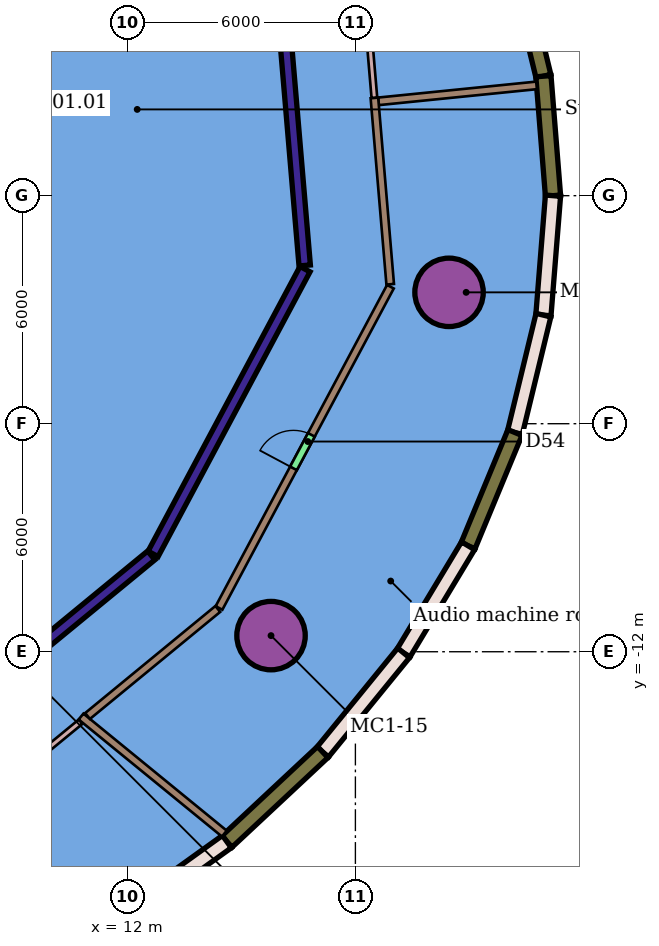
"""IFC4 building model, lengths in metres.
Left out: names, types, materials, properties, quantities, classifications, styles, units other than length and angle.
Written with IfcOpenShell. Run it as: python <this file> out.ifc"""

import sys

from ifc_helpers import new_model, si_unit, direction, frame, frame_2d, origin, origin_2d, place, context, subcontext, project, spatial, rectangle, hollow_circle, extrude, element, fill, save


model = new_model("IFC4")
c1 = context("Model", 3, precision=1e-05, world=origin(), true_north=direction((0.0, 1.0)))
c2 = subcontext(c1, "Body", "Model", "MODEL_VIEW")
j1 = project(units=[si_unit("LENGTHUNIT", "METRE"), si_unit("PLANEANGLEUNIT", "RADIAN")], contexts=[c1])
p1 = place(None, origin())
s1 = spatial("IfcSite", under=j1, at=p1, CompositionType="ELEMENT")
p2 = place(p1, origin())
s2 = spatial("IfcBuilding", under=s1, at=p2, CompositionType="ELEMENT")
p3 = place(p2, frame((0.0, 0.0, 8.0)))
s3 = spatial("IfcBuildingStorey", under=s2, at=p3, CompositionType="ELEMENT", Elevation=8.0)
for number, where, z_axis, x_axis in (
    (1, (15.78, -11.576, 0.0), (0.0, 0.0, 1.0), (1.0, 0.0, 0.0)),
    (2, (20.464, -2.543, 0.0), (0.0, 0.0, 1.0), (1.0, 0.0, 0.0)),
):
    element("IfcColumn", number, at=place(p3, frame(where, z_axis=z_axis, x_axis=x_axis)), inside=s3, PredefinedType="COLUMN", context=c2, shape_type="SweptSolid", body=[
        extrude(hollow_circle(Radius=0.9, WallThickness=0.06, at=origin_2d()), origin(), (0.0, 0.0, 1.0), 8.8),
    ])
p4 = place(p3, frame((15.968, 6.399, 0.0), z_axis=(0.0, 0.0, 1.0), x_axis=(0.084507198304, -0.996422868784, 0.0)))
e3 = element("IfcWall", 3, at=p4, inside=s3, PredefinedType="PARTITIONING", context=c2, shape_type="SweptSolid", body=[
    extrude(rectangle(XDim=8.265, YDim=0.3, at=frame_2d((4.133, 0.0))), origin(), (0.0, 0.0, 1.0), 8.35),
])
p5 = place(p3, frame((12.676, -9.427, 0.0), z_axis=(0.0, 0.0, 1.0), x_axis=(0.470743396375, 0.882270171076, 0.0)))
e4 = element("IfcWall", 4, at=p5, inside=s3, PredefinedType="PARTITIONING", context=c2, shape_type="SweptSolid", body=[
    extrude(rectangle(XDim=8.493, YDim=0.3, at=frame_2d((4.247, 0.0))), origin(), (0.0, 0.0, 1.0), 8.35),
])
p6 = place(p3, frame((8.341, -12.989, 0.0), z_axis=(0.0, 0.0, 1.0), x_axis=(0.772581343642, 0.634915795564, 0.0)))
e5 = element("IfcWall", 5, at=p6, inside=s3, PredefinedType="PARTITIONING", context=c2, shape_type="SweptSolid", body=[
    extrude(rectangle(XDim=5.549, YDim=0.3, at=frame_2d((2.774, 0.0))), origin(), (0.0, 0.0, 1.0), 8.35),
])
p7 = place(p3, frame((18.61, 2.482, 0.0), z_axis=(0.0, 0.0, 1.0), x_axis=(0.994954113111, 0.100331016163, 0.0)))
e6 = element("IfcWall", 6, at=p7, inside=s3, PredefinedType="PARTITIONING", context=c2, shape_type="SweptSolid", body=[
    extrude(rectangle(XDim=4.178, YDim=0.2, at=frame_2d((2.089, 0.0))), origin(), (0.0, 0.0, 1.0), 8.35),
])
p8 = place(p3, frame((18.098, 7.319, 0.0), z_axis=(0.0, 0.0, 1.0), x_axis=(0.084470678546, -0.996425965371, 0.0)))
e7 = element("IfcWall", 7, at=p8, inside=s3, PredefinedType="PARTITIONING", context=c2, shape_type="SweptSolid", body=[
    extrude(rectangle(XDim=4.763, YDim=0.15, at=frame_2d((2.382, 0.0))), origin(), (0.0, 0.0, 1.0), 8.35),
])
p9 = place(p3, frame((10.78, -13.705, 0.0), z_axis=(0.0, 0.0, 1.0), x_axis=(0.774508790893, -0.63256314533, 0.0)))
e8 = element("IfcWall", 8, at=p9, inside=s3, PredefinedType="PARTITIONING", context=c2, shape_type="SweptSolid", body=[
    extrude(rectangle(XDim=4.869, YDim=0.2, at=frame_2d((2.435, 0.0))), origin(), (0.0, 0.0, 1.0), 8.35),
])
p10 = place(p3, frame((7.594, -16.45, 0.0), z_axis=(0.0, 0.0, 1.0), x_axis=(0.772588776597, 0.634906750851, 0.0)))
e9 = element("IfcWall", 9, at=p10, inside=s3, PredefinedType="PARTITIONING", context=c2, shape_type="SweptSolid", body=[
    extrude(rectangle(XDim=4.107, YDim=0.15, at=frame_2d((2.053, 0.0))), origin(), (0.0, 0.0, 1.0), 8.35),
])
p11 = place(p3, frame((10.952, -13.691, 0.0), z_axis=(0.0, 0.0, 1.0), x_axis=(0.772574866308, 0.634923677263, 0.0)))
e10 = element("IfcWall", 10, at=p11, inside=s3, PredefinedType="PARTITIONING", context=c2, shape_type="SweptSolid", body=[
    extrude(rectangle(XDim=4.436, YDim=0.2, at=frame_2d((2.218, 0.0))), origin(), (0.0, 0.0, 1.0), 8.35),
])
p12 = place(p3, frame((14.411, -10.848, 0.0), z_axis=(0.0, 0.0, 1.0), x_axis=(0.47073503873, 0.882274630323, 0.0)))
e11 = element("IfcWall", 11, at=p12, inside=s3, PredefinedType="PARTITIONING", context=c2, shape_type="SweptSolid", body=[
    extrude(rectangle(XDim=9.581, YDim=0.2, at=frame_2d((4.791, 0.0))), origin(), (0.0, 0.0, 1.0), 8.35),
])
p13 = place(p12, frame((4.164, 0.0, 0.0)))
e12 = element("IfcOpeningElement", 12, at=p13, cuts=e11, PredefinedType="OPENING", context=c2, shape_type="SweptSolid", body=[
    extrude(rectangle(XDim=1.0, YDim=2.1, at=frame_2d((0.5, 1.05))), frame((0.0, 0.11, 0.0), z_axis=(0.0, -1.0, 0.0), x_axis=(1.0, 0.0, 0.0)), (0.0, 0.0, 1.0), 0.22),
])
p14 = place(p3, frame((18.5, 2.572, 0.0), z_axis=(0.0, 0.0, 1.0), x_axis=(0.084503198211, -0.996423208026, 0.0)))
e13 = element("IfcWall", 13, at=p14, inside=s3, PredefinedType="PARTITIONING", context=c2, shape_type="SweptSolid", body=[
    extrude(rectangle(XDim=4.92, YDim=0.2, at=frame_2d((2.46, 0.0))), origin(), (0.0, 0.0, 1.0), 8.35),
])
p15 = place(p3, frame((22.198, 6.232, 0.0), z_axis=(0.0, 0.0, 1.0), x_axis=(0.235896812421, -0.97177810939, 0.0)))
e14 = element("IfcWall", 14, at=p15, inside=s3, PredefinedType="SOLIDWALL", context=c2, shape_type="SweptSolid", body=[
    extrude(rectangle(XDim=3.178, YDim=0.4, at=frame_2d((1.589, 0.0))), origin(), (0.0, 0.0, 1.0), 8.8),
])
p16 = place(p3, frame((22.948, 3.144, 0.0), z_axis=(0.0, 0.0, 1.0), x_axis=(0.079732915346, -0.996816263015, 0.0)))
e15 = element("IfcWall", 15, at=p16, inside=s3, PredefinedType="SOLIDWALL", context=c2, shape_type="SweptSolid", body=[
    extrude(rectangle(XDim=3.154, YDim=0.4, at=frame_2d((1.577, 0.0))), origin(), (0.0, 0.0, 1.0), 8.8),
])
p17 = place(p3, frame((23.199, 0.0, 0.0), z_axis=(0.0, 0.0, 1.0), x_axis=(-0.079732915346, -0.996816263015, 0.0)))
e16 = element("IfcWall", 16, at=p17, inside=s3, PredefinedType="SOLIDWALL", context=c2, shape_type="SweptSolid", body=[
    extrude(rectangle(XDim=3.154, YDim=0.4, at=frame_2d((1.577, 0.0))), origin(), (0.0, 0.0, 1.0), 8.4),
])
p18 = place(p3, frame((22.948, -3.144, 0.0), z_axis=(0.0, 0.0, 1.0), x_axis=(-0.235896812421, -0.97177810939, 0.0)))
e17 = element("IfcWall", 17, at=p18, inside=s3, PredefinedType="SOLIDWALL", context=c2, shape_type="SweptSolid", body=[
    extrude(rectangle(XDim=3.178, YDim=0.4, at=frame_2d((1.589, 0.0))), origin(), (0.0, 0.0, 1.0), 8.4),
])
p19 = place(p3, frame((22.198, -6.232, 0.0), z_axis=(0.0, 0.0, 1.0), x_axis=(-0.382706172342, -0.923870112976, 0.0)))
e18 = element("IfcWall", 18, at=p19, inside=s3, PredefinedType="SOLIDWALL", context=c2, shape_type="SweptSolid", body=[
    extrude(rectangle(XDim=3.225, YDim=0.4, at=frame_2d((1.612, 0.0))), origin(), (0.0, 0.0, 1.0), 8.8),
])
p20 = place(p3, frame((20.964, -9.212, 0.0), z_axis=(0.0, 0.0, 1.0), x_axis=(-0.515586767828, -0.856837373625, 0.0)))
e19 = element("IfcWall", 19, at=p20, inside=s3, PredefinedType="SOLIDWALL", context=c2, shape_type="SweptSolid", body=[
    extrude(rectangle(XDim=3.29, YDim=0.4, at=frame_2d((1.645, 0.0))), origin(), (0.0, 0.0, 1.0), 8.4),
])
p21 = place(p3, frame((19.268, -12.03, 0.0), z_axis=(0.0, 0.0, 1.0), x_axis=(-0.631953724698, -0.775006122453, 0.0)))
e20 = element("IfcWall", 20, at=p21, inside=s3, PredefinedType="SOLIDWALL", context=c2, shape_type="SweptSolid", body=[
    extrude(rectangle(XDim=3.367, YDim=0.4, at=frame_2d((1.684, 0.0))), origin(), (0.0, 0.0, 1.0), 8.4),
])
p22 = place(p3, frame((17.14, -14.64, 0.0), z_axis=(0.0, 0.0, 1.0), x_axis=(-0.730641209912, -0.682761614605, 0.0)))
e21 = element("IfcWall", 21, at=p22, inside=s3, PredefinedType="SOLIDWALL", context=c2, shape_type="SweptSolid", body=[
    extrude(rectangle(XDim=3.452, YDim=0.4, at=frame_2d((1.726, 0.0))), origin(), (0.0, 0.0, 1.0), 8.8),
])
p23 = place(p3, frame((14.618, -16.997, 0.0), z_axis=(0.0, 0.0, 1.0), x_axis=(-0.81205624831, -0.583579171648, 0.0)))
e22 = element("IfcWall", 22, at=p23, inside=s3, PredefinedType="SOLIDWALL", context=c2, shape_type="SweptSolid", body=[
    extrude(rectangle(XDim=3.538, YDim=0.4, at=frame_2d((1.769, 0.0))), origin(), (0.0, 0.0, 1.0), 8.4),
])
p24 = place(p13, origin())
e23 = element("IfcDoor", 23, at=p24, inside=s3, OperationType="SINGLE_SWING_LEFT", PredefinedType="DOOR", context=c2, shape_type="SweptSolid", body=[
    extrude(rectangle(XDim=1.0, YDim=2.1, at=frame_2d((0.5, 1.05))), frame((0.0, 0.025, 0.0), z_axis=(0.0, -1.0, 0.0), x_axis=(1.0, 0.0, 0.0)), (0.0, 0.0, 1.0), 0.05),
])
fill(e12, e23)
save(model, sys.argv[1])
